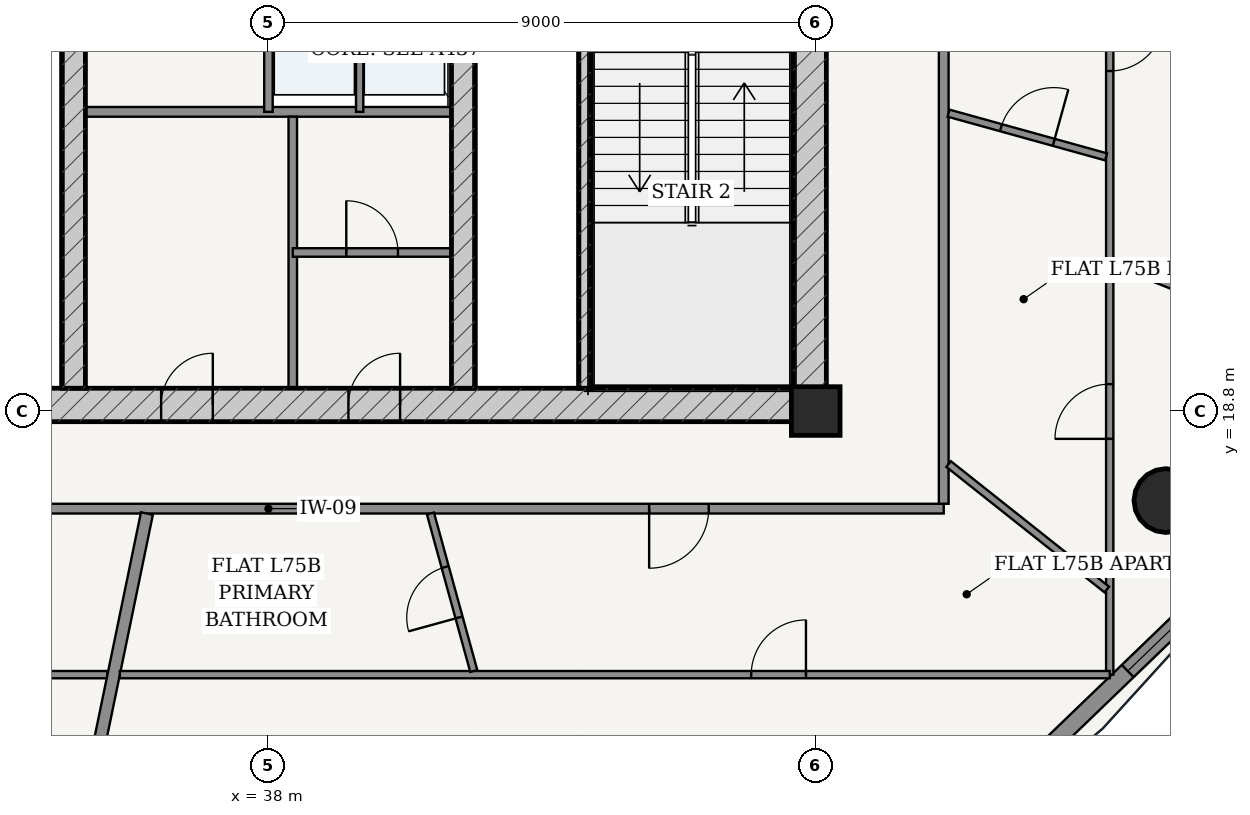
"""IFC4 building model, lengths in metres.
Left out: names, types, materials, properties, quantities, classifications, styles, units other than length and angle.
Written with IfcOpenShell. Run it as: python <this file> out.ifc"""

import sys

from ifc_helpers import new_model, si_unit, direction, frame, frame_2d, origin, origin_2d, place, context, subcontext, project, spatial, rectangle, hollow_circle, extrude, source, transform, mapped, element, fill, save


model = new_model("IFC4")
c1 = context("Model", 3, precision=1e-05, world=origin(), true_north=direction((-0.2419218956, 0.970295726276)))
c2 = subcontext(c1, "Body", "Model", "MODEL_VIEW")
j1 = project(units=[si_unit("LENGTHUNIT", "METRE"), si_unit("PLANEANGLEUNIT", "RADIAN")], contexts=[c1])
p1 = place(None, origin())
s1 = spatial("IfcSite", under=j1, at=p1, CompositionType="ELEMENT")
p2 = place(p1, origin())
s2 = spatial("IfcBuilding", under=s1, at=p2, CompositionType="ELEMENT")
p3 = place(p2, frame((0.0, 0.0, 285.7)))
s3 = spatial("IfcBuildingStorey", under=s2, at=p3, CompositionType="ELEMENT", Elevation=285.7)
p4 = place(p3, frame((47.0, 18.8, 0.0), z_axis=(0.0, 0.0, 1.0), x_axis=(1.0, 0.0, 0.0)))
e1 = element("IfcColumn", 1, at=p4, inside=s3, PredefinedType="COLUMN", context=c2, shape_type="SweptSolid", body=[
    extrude(rectangle(XDim=0.8, YDim=0.8, at=origin_2d()), origin(), (0.0, 0.0, 1.0), 3.75),
])
p5 = place(p3, frame((28.825, 18.9, 0.0), z_axis=(0.0, 0.0, 1.0), x_axis=(1.0, 0.0, 0.0)))
e2 = element("IfcWall", 2, at=p5, inside=s3, PredefinedType="SHEAR", context=c2, shape_type="SweptSolid", body=[
    extrude(rectangle(XDim=18.35, YDim=0.55, at=frame_2d((9.175, 0.0))), origin(), (0.0, 0.0, 1.0), 3.49),
])
p6 = place(p5, frame((7.41, 0.0, 0.0)))
e3 = element("IfcOpeningElement", 3, at=p6, cuts=e2, PredefinedType="OPENING", context=c2, shape_type="SweptSolid", body=[
    extrude(rectangle(XDim=0.85, YDim=2.1, at=frame_2d((0.425, 1.05))), frame((0.0, 0.285, 0.0), z_axis=(0.0, -1.0, 0.0), x_axis=(1.0, 0.0, 0.0)), (0.0, 0.0, 1.0), 0.57),
])
p7 = place(p5, frame((10.49, 0.0, 0.0)))
e4 = element("IfcOpeningElement", 4, at=p7, cuts=e2, PredefinedType="OPENING", context=c2, shape_type="SweptSolid", body=[
    extrude(rectangle(XDim=0.85, YDim=2.1, at=frame_2d((0.425, 1.05))), frame((0.0, 0.285, 0.0), z_axis=(0.0, -1.0, 0.0), x_axis=(1.0, 0.0, 0.0)), (0.0, 0.0, 1.0), 0.57),
])
p8 = place(p3, frame((46.9, 19.175, 0.0), z_axis=(0.0, 0.0, 1.0), x_axis=(0.0, 1.0, 0.0)))
e5 = element("IfcWall", 5, at=p8, inside=s3, PredefinedType="SHEAR", context=c2, shape_type="SweptSolid", body=[
    extrude(rectangle(XDim=15.25, YDim=0.55, at=frame_2d((7.625, 0.0))), origin(), (0.0, 0.0, 1.0), 3.49),
])
p9 = place(p8, frame((9.875, 0.0, 0.0)))
e6 = element("IfcOpeningElement", 6, at=p9, cuts=e5, PredefinedType="OPENING", context=c2, shape_type="SweptSolid", body=[
    extrude(rectangle(XDim=1.5, YDim=2.2, at=frame_2d((0.75, 1.1))), frame((0.0, 0.285, 0.0), z_axis=(0.0, -1.0, 0.0), x_axis=(1.0, 0.0, 0.0)), (0.0, 0.0, 1.0), 0.57),
])
p10 = place(p3, frame((43.205, 19.175, 0.0), z_axis=(0.0, 0.0, 1.0), x_axis=(0.0, 1.0, 0.0)))
e7 = element("IfcWall", 7, at=p10, inside=s3, PredefinedType="SOLIDWALL", context=c2, shape_type="SweptSolid", body=[
    extrude(rectangle(XDim=7.375, YDim=0.2, at=frame_2d((3.688, 0.0))), origin(), (0.0, 0.0, 1.0), 3.49),
])
p11 = place(p3, frame((34.8, 19.175, 0.0), z_axis=(0.0, 0.0, 1.0), x_axis=(0.0, 1.0, 0.0)))
e8 = element("IfcWall", 8, at=p11, inside=s3, PredefinedType="SHEAR", context=c2, shape_type="SweptSolid", body=[
    extrude(rectangle(XDim=15.25, YDim=0.38, at=frame_2d((7.625, 0.0))), origin(), (0.0, 0.0, 1.0), 3.49),
])
p12 = place(p11, frame((7.8, 0.0, 0.0)))
e9 = element("IfcOpeningElement", 9, at=p12, cuts=e8, PredefinedType="OPENING", context=c2, shape_type="SweptSolid", body=[
    extrude(rectangle(XDim=1.05, YDim=2.15, at=frame_2d((0.525, 1.075))), frame((0.0, 0.2, 0.0), z_axis=(0.0, -1.0, 0.0), x_axis=(1.0, 0.0, 0.0)), (0.0, 0.0, 1.0), 0.4),
])
p13 = place(p3, frame((41.2, 19.175, 0.0), z_axis=(0.0, 0.0, 1.0), x_axis=(0.0, 1.0, 0.0)))
e10 = element("IfcWall", 10, at=p13, inside=s3, PredefinedType="SHEAR", context=c2, shape_type="SweptSolid", body=[
    extrude(rectangle(XDim=15.25, YDim=0.38, at=frame_2d((7.625, 0.0))), origin(), (0.0, 0.0, 1.0), 3.49),
])
p14 = place(p13, frame((7.8, 0.0, 0.0)))
e11 = element("IfcOpeningElement", 11, at=p14, cuts=e10, PredefinedType="OPENING", context=c2, shape_type="SweptSolid", body=[
    extrude(rectangle(XDim=1.05, YDim=2.15, at=frame_2d((0.525, 1.075))), frame((0.0, 0.2, 0.0), z_axis=(0.0, -1.0, 0.0), x_axis=(1.0, 0.0, 0.0)), (0.0, 0.0, 1.0), 0.4),
])
p15 = place(p3, frame((52.759, 17.328, 0.0), z_axis=(0.0, 0.0, 1.0), x_axis=(1.0, 0.0, 0.0)))
e12 = element("IfcColumn", 12, at=p15, inside=s3, PredefinedType="COLUMN", context=c2, shape_type="SweptSolid", body=[
    extrude(hollow_circle(Radius=0.525, WallThickness=0.035, at=origin_2d()), origin(), (0.0, 0.0, 1.0), 3.75),
])
p16 = place(p3, frame((48.704, 11.221, 0.0), z_axis=(0.0, 0.0, 1.0), x_axis=(0.719995397366, 0.69397883813, 0.0)))
e13 = element("IfcWall", 13, at=p16, inside=s3, PredefinedType="SOLIDWALL", context=c2, shape_type="SweptSolid", body=[
    extrude(rectangle(XDim=7.582, YDim=0.28, at=frame_2d((3.791, 0.0))), origin(), (0.0, 0.0, 1.0), 3.49),
])
p17 = place(p16, frame((1.272, 0.0, 0.85)))
e14 = element("IfcOpeningElement", 14, at=p17, cuts=e13, PredefinedType="OPENING", context=c2, shape_type="SweptSolid", body=[
    extrude(rectangle(XDim=1.55, YDim=1.95, at=frame_2d((0.775, 0.975))), frame((0.0, 0.15, 0.0), z_axis=(0.0, -1.0, 0.0), x_axis=(1.0, 0.0, 0.0)), (0.0, 0.0, 1.0), 0.3),
])
p18 = place(p16, frame((4.76, 0.0, 0.85)))
e15 = element("IfcOpeningElement", 15, at=p18, cuts=e13, PredefinedType="OPENING", context=c2, shape_type="SweptSolid", body=[
    extrude(rectangle(XDim=1.55, YDim=1.95, at=frame_2d((0.775, 0.975))), frame((0.0, 0.15, 0.0), z_axis=(0.0, -1.0, 0.0), x_axis=(1.0, 0.0, 0.0)), (0.0, 0.0, 1.0), 0.3),
])
p19 = place(p3, frame((34.99, 23.72, 0.0), z_axis=(0.0, 0.0, 1.0), x_axis=(1.0, 0.0, 0.0)))
e16 = element("IfcWall", 16, at=p19, inside=s3, PredefinedType="PARTITIONING", context=c2, shape_type="SweptSolid", body=[
    extrude(rectangle(XDim=6.02, YDim=0.16, at=frame_2d((3.01, 0.0))), origin(), (0.0, 0.0, 1.0), 3.49),
])
p20 = place(p3, frame((38.0, 23.72, 0.0), z_axis=(0.0, 0.0, 1.0), x_axis=(0.0, 1.0, 0.0)))
e17 = element("IfcWall", 17, at=p20, inside=s3, PredefinedType="PARTITIONING", context=c2, shape_type="SweptSolid", body=[
    extrude(rectangle(XDim=2.56, YDim=0.14, at=frame_2d((1.28, 0.0))), origin(), (0.0, 0.0, 1.0), 3.49),
])
p21 = place(p3, frame((39.5, 23.72, 0.0), z_axis=(0.0, 0.0, 1.0), x_axis=(0.0, 1.0, 0.0)))
e18 = element("IfcWall", 18, at=p21, inside=s3, PredefinedType="PARTITIONING", context=c2, shape_type="SweptSolid", body=[
    extrude(rectangle(XDim=2.56, YDim=0.12, at=frame_2d((1.28, 0.0))), origin(), (0.0, 0.0, 1.0), 3.49),
])
p22 = place(p3, frame((38.4, 19.175, 0.0), z_axis=(0.0, 0.0, 1.0), x_axis=(0.0, 1.0, 0.0)))
e19 = element("IfcWall", 19, at=p22, inside=s3, PredefinedType="PARTITIONING", context=c2, shape_type="SweptSolid", body=[
    extrude(rectangle(XDim=4.465, YDim=0.14, at=frame_2d((2.232, 0.0))), origin(), (0.0, 0.0, 1.0), 3.49),
])
p23 = place(p3, frame((38.4, 21.407, 0.0), z_axis=(0.0, 0.0, 1.0), x_axis=(1.0, 0.0, 0.0)))
e20 = element("IfcWall", 20, at=p23, inside=s3, PredefinedType="PARTITIONING", context=c2, shape_type="SweptSolid", body=[
    extrude(rectangle(XDim=2.61, YDim=0.14, at=frame_2d((1.305, 0.0))), origin(), (0.0, 0.0, 1.0), 3.49),
])
p24 = place(p23, frame((0.88, 0.0, 0.0)))
e21 = element("IfcOpeningElement", 21, at=p24, cuts=e20, PredefinedType="OPENING", context=c2, shape_type="SweptSolid", body=[
    extrude(rectangle(XDim=0.85, YDim=2.1, at=frame_2d((0.425, 1.05))), frame((0.0, 0.08, 0.0), z_axis=(0.0, -1.0, 0.0), x_axis=(1.0, 0.0, 0.0)), (0.0, 0.0, 1.0), 0.16),
])
p25 = place(p3, frame((26.895, 17.195, 0.0), z_axis=(0.0, 0.0, 1.0), x_axis=(1.0, 0.0, 0.0)))
e22 = element("IfcWall", 22, at=p25, inside=s3, PredefinedType="PARTITIONING", context=c2, shape_type="SweptSolid", body=[
    extrude(rectangle(XDim=22.21, YDim=0.16, at=frame_2d((11.105, 0.0))), origin(), (0.0, 0.0, 1.0), 3.015),
])
p26 = place(p25, frame((17.365, 0.0, 0.0)))
e23 = element("IfcOpeningElement", 23, at=p26, cuts=e22, PredefinedType="OPENING", context=c2, shape_type="SweptSolid", body=[
    extrude(rectangle(XDim=0.98, YDim=2.2, at=frame_2d((0.49, 1.1))), frame((0.0, 0.09, 0.0), z_axis=(0.0, -1.0, 0.0), x_axis=(1.0, 0.0, 0.0)), (0.0, 0.0, 1.0), 0.18),
])
p27 = place(p3, frame((49.105, 17.275, 0.0), z_axis=(0.0, 0.0, 1.0), x_axis=(0.0, 1.0, 0.0)))
e24 = element("IfcWall", 24, at=p27, inside=s3, PredefinedType="PARTITIONING", context=c2, shape_type="SweptSolid", body=[
    extrude(rectangle(XDim=13.925, YDim=0.16, at=frame_2d((6.962, 0.0))), origin(), (0.0, 0.0, 1.0), 3.015),
])
p28 = place(p3, frame((35.353, 14.465, 0.0), z_axis=(0.0, 0.0, 1.0), x_axis=(-1.0, 0.0, 0.0)))
e25 = element("IfcWall", 25, at=p28, inside=s3, PredefinedType="PARTITIONING", context=c2, shape_type="SweptSolid", body=[
    extrude(rectangle(XDim=11.188, YDim=0.12, at=frame_2d((5.594, 0.0))), origin(), (0.0, 0.0, 1.0), 3.015),
])
p29 = place(p28, frame((3.997, 0.0, 0.0)))
e26 = element("IfcOpeningElement", 26, at=p29, cuts=e25, PredefinedType="OPENING", context=c2, shape_type="SweptSolid", body=[
    extrude(rectangle(XDim=0.9, YDim=2.15, at=frame_2d((0.45, 1.075))), frame((0.0, 0.07, 0.0), z_axis=(0.0, -1.0, 0.0), x_axis=(1.0, 0.0, 0.0)), (0.0, 0.0, 1.0), 0.14),
])
p30 = place(p3, frame((36.001, 17.115, 0.0), z_axis=(0.0, 0.0, 1.0), x_axis=(-0.202108543081, -0.979363128167, 0.0)))
e27 = element("IfcWall", 27, at=p30, inside=s3, PredefinedType="PARTITIONING", context=c2, shape_type="SweptSolid", body=[
    extrude(rectangle(XDim=8.739, YDim=0.2, at=frame_2d((4.369, 0.0))), origin(), (0.0, 0.0, 1.0), 3.015),
])
p31 = place(p3, frame((51.835, 34.01, 0.0), z_axis=(0.0, 0.0, 1.0), x_axis=(0.0, -1.0, 0.0)))
e28 = element("IfcWall", 28, at=p31, inside=s3, PredefinedType="PARTITIONING", context=c2, shape_type="SweptSolid", body=[
    extrude(rectangle(XDim=19.545, YDim=0.12, at=frame_2d((9.772, 0.0))), origin(), (0.0, 0.0, 1.0), 3.015),
])
p32 = place(p31, frame((14.768, 0.0, 0.0)))
e29 = element("IfcOpeningElement", 29, at=p32, cuts=e28, PredefinedType="OPENING", context=c2, shape_type="SweptSolid", body=[
    extrude(rectangle(XDim=0.9, YDim=2.15, at=frame_2d((0.45, 1.075))), frame((0.0, 0.07, 0.0), z_axis=(0.0, -1.0, 0.0), x_axis=(1.0, 0.0, 0.0)), (0.0, 0.0, 1.0), 0.14),
])
p33 = place(p31, frame((8.718, 0.0, 0.0)))
e30 = element("IfcOpeningElement", 30, at=p33, cuts=e28, PredefinedType="OPENING", context=c2, shape_type="SweptSolid", body=[
    extrude(rectangle(XDim=0.9, YDim=2.15, at=frame_2d((0.45, 1.075))), frame((0.0, 0.07, 0.0), z_axis=(0.0, -1.0, 0.0), x_axis=(1.0, 0.0, 0.0)), (0.0, 0.0, 1.0), 0.14),
])
p34 = place(p31, frame((4.14, 0.0, 0.0)))
e31 = element("IfcOpeningElement", 31, at=p34, cuts=e28, PredefinedType="OPENING", context=c2, shape_type="SweptSolid", body=[
    extrude(rectangle(XDim=0.9, YDim=2.15, at=frame_2d((0.45, 1.075))), frame((0.0, 0.07, 0.0), z_axis=(0.0, -1.0, 0.0), x_axis=(1.0, 0.0, 0.0)), (0.0, 0.0, 1.0), 0.14),
])
p35 = place(p3, frame((51.835, 14.465, 0.0), z_axis=(0.0, 0.0, 1.0), x_axis=(-1.0, 0.0, 0.0)))
e32 = element("IfcWall", 32, at=p35, inside=s3, PredefinedType="PARTITIONING", context=c2, shape_type="SweptSolid", body=[
    extrude(rectangle(XDim=16.278, YDim=0.12, at=frame_2d((8.139, 0.0))), origin(), (0.0, 0.0, 1.0), 3.015),
])
p36 = place(p35, frame((4.996, 0.0, 0.0)))
e33 = element("IfcOpeningElement", 33, at=p36, cuts=e32, PredefinedType="OPENING", context=c2, shape_type="SweptSolid", body=[
    extrude(rectangle(XDim=0.9, YDim=2.15, at=frame_2d((0.45, 1.075))), frame((0.0, 0.07, 0.0), z_axis=(0.0, -1.0, 0.0), x_axis=(1.0, 0.0, 0.0)), (0.0, 0.0, 1.0), 0.14),
])
p37 = place(p3, frame((51.893, 21.253, 0.0), z_axis=(0.0, 0.0, 1.0), x_axis=(0.928712556691, -0.370800467966, 0.0)))
e34 = element("IfcWall", 34, at=p37, inside=s3, PredefinedType="PARTITIONING", context=c2, shape_type="SweptSolid", body=[
    extrude(rectangle(XDim=4.28, YDim=0.12, at=frame_2d((2.14, 0.0))), origin(), (0.0, 0.0, 1.0), 3.121),
])
p38 = place(p3, frame((40.664, 17.115, 0.0), z_axis=(0.0, 0.0, 1.0), x_axis=(0.265177604745, -0.964199584081, 0.0)))
e35 = element("IfcWall", 35, at=p38, inside=s3, PredefinedType="PARTITIONING", context=c2, shape_type="SweptSolid", body=[
    extrude(rectangle(XDim=2.687, YDim=0.12, at=frame_2d((1.343, 0.0))), origin(), (0.0, 0.0, 1.0), 3.209),
])
p39 = place(p38, frame((0.913, 0.0, 0.0)))
e36 = element("IfcOpeningElement", 36, at=p39, cuts=e35, PredefinedType="OPENING", context=c2, shape_type="SweptSolid", body=[
    extrude(rectangle(XDim=0.86, YDim=2.15, at=frame_2d((0.43, 1.075))), frame((0.0, 0.07, 0.0), z_axis=(0.0, -1.0, 0.0), x_axis=(1.0, 0.0, 0.0)), (0.0, 0.0, 1.0), 0.14),
])
p40 = place(p3, frame((49.185, 17.928, 0.0), z_axis=(0.0, 0.0, 1.0), x_axis=(0.78348039615, -0.621416501912, 0.0)))
e37 = element("IfcWall", 37, at=p40, inside=s3, PredefinedType="PARTITIONING", context=c2, shape_type="SweptSolid", body=[
    extrude(rectangle(XDim=3.32, YDim=0.12, at=frame_2d((1.66, 0.0))), origin(), (0.0, 0.0, 1.0), 3.121),
])
p41 = place(p3, frame((49.185, 23.698, 0.0), z_axis=(0.0, 0.0, 1.0), x_axis=(0.963633636359, -0.267226897744, 0.0)))
e38 = element("IfcWall", 38, at=p41, inside=s3, PredefinedType="PARTITIONING", context=c2, shape_type="SweptSolid", body=[
    extrude(rectangle(XDim=2.688, YDim=0.12, at=frame_2d((1.344, 0.0))), origin(), (0.0, 0.0, 1.0), 3.209),
])
p42 = place(p41, frame((0.894, 0.0, 0.0)))
e39 = element("IfcOpeningElement", 39, at=p42, cuts=e38, PredefinedType="OPENING", context=c2, shape_type="SweptSolid", body=[
    extrude(rectangle(XDim=0.9, YDim=2.15, at=frame_2d((0.45, 1.075))), frame((0.0, 0.07, 0.0), z_axis=(0.0, -1.0, 0.0), x_axis=(1.0, 0.0, 0.0)), (0.0, 0.0, 1.0), 0.14),
])
m1 = source(origin(), c2, "Body", "SweptSolid", [
    extrude(rectangle(XDim=1.55, YDim=1.95, at=frame_2d((0.775, 0.975))), frame((0.0, 0.03, 0.0), z_axis=(0.0, -1.0, 0.0), x_axis=(1.0, 0.0, 0.0)), (0.0, 0.0, 1.0), 0.06),
])
p43 = place(p18, origin())
e40 = element("IfcWindow", 40, at=p43, inside=s3, PartitioningType="SINGLE_PANEL", PredefinedType="WINDOW", context=c2, shape_type="MappedRepresentation", body=[
    mapped(m1, transform((0.0, 0.0, 0.0), scale=1.0)),
])
fill(e15, e40)
m2 = source(origin(), c2, "Body", "SweptSolid", [
    extrude(rectangle(XDim=0.85, YDim=2.1, at=frame_2d((0.425, 1.05))), frame((0.0, 0.025, 0.0), z_axis=(0.0, -1.0, 0.0), x_axis=(1.0, 0.0, 0.0)), (0.0, 0.0, 1.0), 0.05),
])
p44 = place(p6, origin())
e41 = element("IfcDoor", 41, at=p44, inside=s3, OperationType="SINGLE_SWING_RIGHT", PredefinedType="DOOR", context=c2, shape_type="MappedRepresentation", body=[
    mapped(m2, transform((0.0, 0.0, 0.0), scale=1.0)),
])
fill(e3, e41)
p45 = place(p7, origin())
e42 = element("IfcDoor", 42, at=p45, inside=s3, OperationType="SINGLE_SWING_RIGHT", PredefinedType="DOOR", context=c2, shape_type="MappedRepresentation", body=[
    mapped(m2, transform((0.0, 0.0, 0.0), scale=1.0)),
])
fill(e4, e42)
p46 = place(p24, origin())
e43 = element("IfcDoor", 43, at=p46, inside=s3, OperationType="SINGLE_SWING_LEFT", PredefinedType="DOOR", context=c2, shape_type="MappedRepresentation", body=[
    mapped(m2, transform((0.0, 0.0, 0.0), scale=1.0)),
])
fill(e21, e43)
m3 = source(origin(), c2, "Body", "SweptSolid", [
    extrude(rectangle(XDim=0.98, YDim=2.2, at=frame_2d((0.49, 1.1))), frame((0.0, 0.025, 0.0), z_axis=(0.0, -1.0, 0.0), x_axis=(1.0, 0.0, 0.0)), (0.0, 0.0, 1.0), 0.05),
])
p47 = place(p26, frame((0.98, 0.0, 0.0), z_axis=(0.0, 0.0, 1.0), x_axis=(-1.0, 0.0, 0.0)))
e44 = element("IfcDoor", 44, at=p47, inside=s3, OperationType="SINGLE_SWING_RIGHT", PredefinedType="DOOR", context=c2, shape_type="MappedRepresentation", body=[
    mapped(m3, transform((0.0, 0.0, 0.0), scale=1.0)),
])
fill(e23, e44)
m4 = source(origin(), c2, "Body", "SweptSolid", [
    extrude(rectangle(XDim=0.86, YDim=2.15, at=frame_2d((0.43, 1.075))), frame((0.0, 0.025, 0.0), z_axis=(0.0, -1.0, 0.0), x_axis=(1.0, 0.0, 0.0)), (0.0, 0.0, 1.0), 0.05),
])
p48 = place(p39, frame((0.86, 0.0, 0.0), z_axis=(0.0, 0.0, 1.0), x_axis=(-1.0, 0.0, 0.0)))
e45 = element("IfcDoor", 45, at=p48, inside=s3, OperationType="SINGLE_SWING_LEFT", PredefinedType="DOOR", context=c2, shape_type="MappedRepresentation", body=[
    mapped(m4, transform((0.0, 0.0, 0.0), scale=1.0)),
])
fill(e36, e45)
m5 = source(origin(), c2, "Body", "SweptSolid", [
    extrude(rectangle(XDim=0.9, YDim=2.15, at=frame_2d((0.45, 1.075))), frame((0.0, 0.025, 0.0), z_axis=(0.0, -1.0, 0.0), x_axis=(1.0, 0.0, 0.0)), (0.0, 0.0, 1.0), 0.05),
])
p49 = place(p36, frame((0.9, 0.0, 0.0), z_axis=(0.0, 0.0, 1.0), x_axis=(-1.0, 0.0, 0.0)))
e46 = element("IfcDoor", 46, at=p49, inside=s3, OperationType="SINGLE_SWING_RIGHT", PredefinedType="DOOR", context=c2, shape_type="MappedRepresentation", body=[
    mapped(m5, transform((0.0, 0.0, 0.0), scale=1.0)),
])
fill(e33, e46)
p50 = place(p32, frame((0.9, 0.0, 0.0), z_axis=(0.0, 0.0, 1.0), x_axis=(-1.0, 0.0, 0.0)))
e47 = element("IfcDoor", 47, at=p50, inside=s3, OperationType="SINGLE_SWING_LEFT", PredefinedType="DOOR", context=c2, shape_type="MappedRepresentation", body=[
    mapped(m5, transform((0.0, 0.0, 0.0), scale=1.0)),
])
fill(e29, e47)
p51 = place(p42, origin())
e48 = element("IfcDoor", 48, at=p51, inside=s3, OperationType="SINGLE_SWING_RIGHT", PredefinedType="DOOR", context=c2, shape_type="MappedRepresentation", body=[
    mapped(m5, transform((0.0, 0.0, 0.0), scale=1.0)),
])
fill(e39, e48)
p52 = place(p33, origin())
e49 = element("IfcDoor", 49, at=p52, inside=s3, OperationType="SINGLE_SWING_LEFT", PredefinedType="DOOR", context=c2, shape_type="MappedRepresentation", body=[
    mapped(m5, transform((0.0, 0.0, 0.0), scale=1.0)),
])
fill(e30, e49)
save(model, sys.argv[1])
